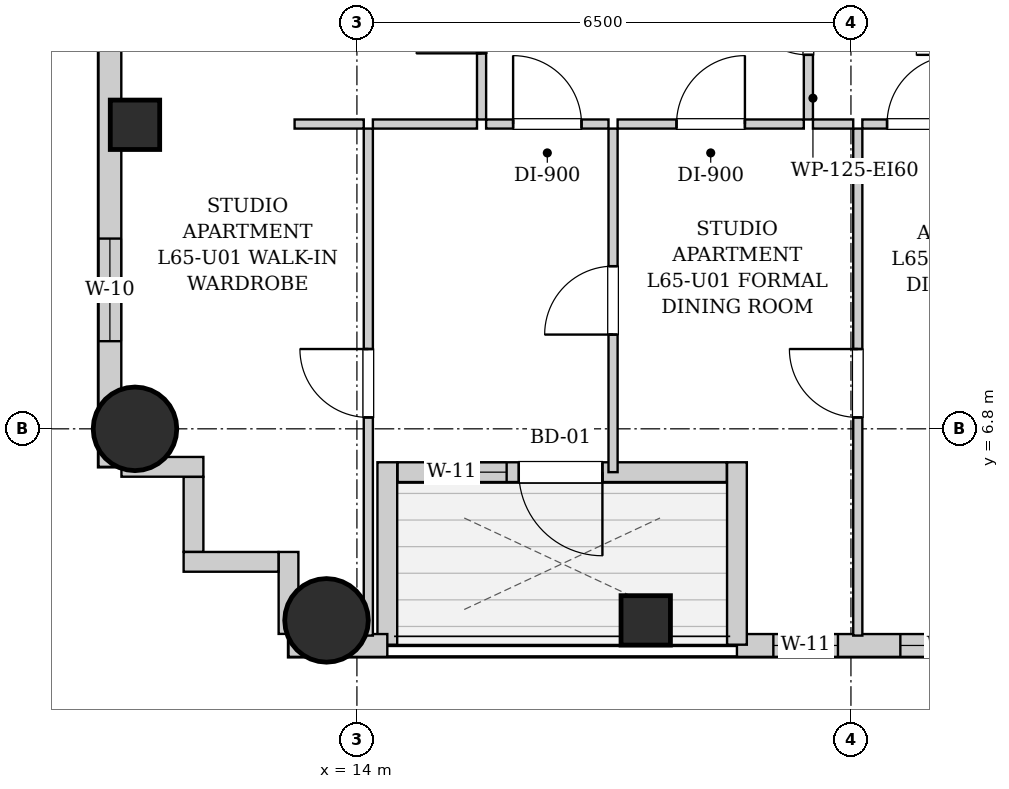
"""IFC4 building model, lengths in metres.
Left out: names, types, materials, properties, quantities, classifications, styles, units other than length and angle.
Written with IfcOpenShell. Run it as: python <this file> out.ifc"""

import sys

from ifc_helpers import new_model, si_unit, direction, frame, frame_2d, origin, origin_2d, place, context, subcontext, project, spatial, rectangle, circle, extrude, element, fill, save


model = new_model("IFC4")
c1 = context("Model", 3, precision=1e-05, world=origin(), true_north=direction((0.0, 1.0)))
c2 = subcontext(c1, "Body", "Model", "MODEL_VIEW")
j1 = project(units=[si_unit("LENGTHUNIT", "METRE"), si_unit("PLANEANGLEUNIT", "RADIAN")], contexts=[c1])
p1 = place(None, origin())
s1 = spatial("IfcSite", under=j1, at=p1, CompositionType="ELEMENT")
p2 = place(p1, origin())
s2 = spatial("IfcBuilding", under=s1, at=p2, CompositionType="ELEMENT")
p3 = place(p2, frame((0.0, 0.0, 224.1)))
s3 = spatial("IfcBuildingStorey", under=s2, at=p3, CompositionType="ELEMENT", Elevation=224.1)
p4 = place(p3, frame((13.6, 4.28, 0.0), z_axis=(0.0, 0.0, 1.0), x_axis=(1.0, 0.0, 0.0)))
e1 = element("IfcColumn", 1, at=p4, inside=s3, PredefinedType="COLUMN", context=c2, shape_type="SweptSolid", body=[
    extrude(circle(Radius=0.55, at=origin_2d()), origin(), (0.0, 0.0, 1.0), 3.4),
])
p5 = place(p3, frame((17.8, 4.28, 0.0), z_axis=(0.0, 0.0, 1.0), x_axis=(1.0, 0.0, 0.0)))
e2 = element("IfcColumn", 2, at=p5, inside=s3, PredefinedType="COLUMN", context=c2, shape_type="SweptSolid", body=[
    extrude(rectangle(XDim=0.65, YDim=0.65, at=origin_2d()), origin(), (0.0, 0.0, 1.0), 3.4),
])
p6 = place(p3, frame((11.08, 6.8, 0.0), z_axis=(0.0, 0.0, 1.0), x_axis=(1.0, 0.0, 0.0)))
e3 = element("IfcColumn", 3, at=p6, inside=s3, PredefinedType="COLUMN", context=c2, shape_type="SweptSolid", body=[
    extrude(circle(Radius=0.55, at=origin_2d()), origin(), (0.0, 0.0, 1.0), 3.4),
])
p7 = place(p3, frame((11.08, 10.8, 0.0), z_axis=(0.0, 0.0, 1.0), x_axis=(1.0, 0.0, 0.0)))
e4 = element("IfcColumn", 4, at=p7, inside=s3, PredefinedType="COLUMN", context=c2, shape_type="SweptSolid", body=[
    extrude(rectangle(XDim=0.65, YDim=0.65, at=origin_2d()), origin(), (0.0, 0.0, 1.0), 3.4),
])
p8 = place(p3, frame((31.5, 3.95, 0.0), z_axis=(0.0, 0.0, 1.0), x_axis=(-1.0, 0.0, 0.0)))
e5 = element("IfcWall", 5, at=p8, inside=s3, PredefinedType="SOLIDWALL", context=c2, shape_type="SweptSolid", body=[
    extrude(rectangle(XDim=12.5, YDim=0.3, at=frame_2d((6.25, 0.0))), origin(), (0.0, 0.0, 1.0), 3.14),
])
p9 = place(p8, frame((11.171, 0.0, 0.55)))
e6 = element("IfcOpeningElement", 6, at=p9, cuts=e5, PredefinedType="OPENING", context=c2, shape_type="SweptSolid", body=[
    extrude(rectangle(XDim=0.85, YDim=1.2, at=frame_2d((0.425, 0.6))), frame((0.0, 0.16, 0.0), z_axis=(0.0, -1.0, 0.0), x_axis=(1.0, 0.0, 0.0)), (0.0, 0.0, 1.0), 0.32),
])
p10 = place(p8, frame((9.0, 0.0, 0.55)))
e7 = element("IfcOpeningElement", 7, at=p10, cuts=e5, PredefinedType="OPENING", context=c2, shape_type="SweptSolid", body=[
    extrude(rectangle(XDim=1.35, YDim=1.2, at=frame_2d((0.675, 0.6))), frame((0.0, 0.16, 0.0), z_axis=(0.0, -1.0, 0.0), x_axis=(1.0, 0.0, 0.0)), (0.0, 0.0, 1.0), 0.32),
])
p11 = place(p8, frame((2.186, 0.0, 0.55)))
e8 = element("IfcOpeningElement", 8, at=p11, cuts=e5, PredefinedType="OPENING", context=c2, shape_type="SweptSolid", body=[
    extrude(rectangle(XDim=1.35, YDim=1.2, at=frame_2d((0.675, 0.6))), frame((0.0, 0.16, 0.0), z_axis=(0.0, -1.0, 0.0), x_axis=(1.0, 0.0, 0.0)), (0.0, 0.0, 1.0), 0.32),
])
p12 = place(p8, frame((0.35, 0.0, 0.55)))
e9 = element("IfcOpeningElement", 9, at=p12, cuts=e5, PredefinedType="OPENING", context=c2, shape_type="SweptSolid", body=[
    extrude(rectangle(XDim=0.68, YDim=1.2, at=frame_2d((0.34, 0.6))), frame((0.0, 0.16, 0.0), z_axis=(0.0, -1.0, 0.0), x_axis=(1.0, 0.0, 0.0)), (0.0, 0.0, 1.0), 0.32),
])
p13 = place(p3, frame((19.0, 3.96, 0.0), z_axis=(0.0, 0.0, 1.0), x_axis=(0.0, 1.0, 0.0)))
e10 = element("IfcWall", 10, at=p13, inside=s3, PredefinedType="SOLIDWALL", context=c2, shape_type="SweptSolid", body=[
    extrude(rectangle(XDim=2.4, YDim=0.26, at=frame_2d((1.2, 0.0))), origin(), (0.0, 0.0, 1.0), 3.14),
])
p14 = place(p3, frame((18.866, 6.23, 0.0), z_axis=(0.0, 0.0, 1.0), x_axis=(-1.0, 0.0, 0.0)))
e11 = element("IfcWall", 11, at=p14, inside=s3, PredefinedType="SOLIDWALL", context=c2, shape_type="SweptSolid", body=[
    extrude(rectangle(XDim=4.332, YDim=0.26, at=frame_2d((2.166, 0.0))), origin(), (0.0, 0.0, 1.0), 3.14),
])
p15 = place(p14, frame((1.636, 0.0, 0.0)))
e12 = element("IfcOpeningElement", 12, at=p15, cuts=e11, PredefinedType="OPENING", context=c2, shape_type="SweptSolid", body=[
    extrude(rectangle(XDim=1.1, YDim=2.0, at=frame_2d((0.55, 1.0))), frame((0.0, 0.14, 0.0), z_axis=(0.0, -1.0, 0.0), x_axis=(1.0, 0.0, 0.0)), (0.0, 0.0, 1.0), 0.28),
])
p16 = place(p14, frame((2.896, 0.0, 0.55)))
e13 = element("IfcOpeningElement", 13, at=p16, cuts=e11, PredefinedType="OPENING", context=c2, shape_type="SweptSolid", body=[
    extrude(rectangle(XDim=0.85, YDim=1.2, at=frame_2d((0.425, 0.6))), frame((0.0, 0.14, 0.0), z_axis=(0.0, -1.0, 0.0), x_axis=(1.0, 0.0, 0.0)), (0.0, 0.0, 1.0), 0.28),
])
p17 = place(p3, frame((14.4, 6.36, 0.0), z_axis=(0.0, 0.0, 1.0), x_axis=(0.0, -1.0, 0.0)))
e14 = element("IfcWall", 14, at=p17, inside=s3, PredefinedType="SOLIDWALL", context=c2, shape_type="SweptSolid", body=[
    extrude(rectangle(XDim=2.4, YDim=0.26, at=frame_2d((1.2, 0.0))), origin(), (0.0, 0.0, 1.0), 3.14),
])
p18 = place(p3, frame((14.4, 3.95, 0.0), z_axis=(0.0, 0.0, 1.0), x_axis=(-1.0, 0.0, 0.0)))
e15 = element("IfcWall", 15, at=p18, inside=s3, PredefinedType="SOLIDWALL", context=c2, shape_type="SweptSolid", body=[
    extrude(rectangle(XDim=1.3, YDim=0.3, at=frame_2d((0.65, 0.0))), origin(), (0.0, 0.0, 1.0), 3.14),
])
p19 = place(p3, frame((10.75, 6.3, 0.0), z_axis=(0.0, 0.0, 1.0), x_axis=(0.0, 1.0, 0.0)))
e16 = element("IfcWall", 16, at=p19, inside=s3, PredefinedType="SOLIDWALL", context=c2, shape_type="SweptSolid", body=[
    extrude(rectangle(XDim=31.4, YDim=0.3, at=frame_2d((15.7, 0.0))), origin(), (0.0, 0.0, 1.0), 3.14),
])
p20 = place(p19, frame((1.653, 0.0, 0.55)))
e17 = element("IfcOpeningElement", 17, at=p20, cuts=e16, PredefinedType="OPENING", context=c2, shape_type="SweptSolid", body=[
    extrude(rectangle(XDim=1.35, YDim=1.2, at=frame_2d((0.675, 0.6))), frame((0.0, 0.16, 0.0), z_axis=(0.0, -1.0, 0.0), x_axis=(1.0, 0.0, 0.0)), (0.0, 0.0, 1.0), 0.32),
])
p21 = place(p19, frame((10.367, 0.0, 0.55)))
e18 = element("IfcOpeningElement", 18, at=p21, cuts=e16, PredefinedType="OPENING", context=c2, shape_type="SweptSolid", body=[
    extrude(rectangle(XDim=1.35, YDim=1.2, at=frame_2d((0.675, 0.6))), frame((0.0, 0.16, 0.0), z_axis=(0.0, -1.0, 0.0), x_axis=(1.0, 0.0, 0.0)), (0.0, 0.0, 1.0), 0.32),
])
p22 = place(p19, frame((19.683, 0.0, 0.55)))
e19 = element("IfcOpeningElement", 19, at=p22, cuts=e16, PredefinedType="OPENING", context=c2, shape_type="SweptSolid", body=[
    extrude(rectangle(XDim=1.35, YDim=1.2, at=frame_2d((0.675, 0.6))), frame((0.0, 0.16, 0.0), z_axis=(0.0, -1.0, 0.0), x_axis=(1.0, 0.0, 0.0)), (0.0, 0.0, 1.0), 0.32),
])
p23 = place(p3, frame((13.1, 4.102, 0.0), z_axis=(0.0, 0.0, 1.0), x_axis=(0.0, 1.0, 0.0)))
e20 = element("IfcWall", 20, at=p23, inside=s3, PredefinedType="SOLIDWALL", context=c2, shape_type="SweptSolid", body=[
    extrude(rectangle(XDim=1.078, YDim=0.26, at=frame_2d((0.539, 0.0))), origin(), (0.0, 0.0, 1.0), 3.14),
])
p24 = place(p3, frame((12.968, 5.05, 0.0), z_axis=(0.0, 0.0, 1.0), x_axis=(-1.0, 0.0, 0.0)))
e21 = element("IfcWall", 21, at=p24, inside=s3, PredefinedType="SOLIDWALL", context=c2, shape_type="SweptSolid", body=[
    extrude(rectangle(XDim=1.248, YDim=0.26, at=frame_2d((0.624, 0.0))), origin(), (0.0, 0.0, 1.0), 3.14),
])
p25 = place(p3, frame((11.85, 5.182, 0.0), z_axis=(0.0, 0.0, 1.0), x_axis=(0.0, 1.0, 0.0)))
e22 = element("IfcWall", 22, at=p25, inside=s3, PredefinedType="SOLIDWALL", context=c2, shape_type="SweptSolid", body=[
    extrude(rectangle(XDim=0.986, YDim=0.26, at=frame_2d((0.493, 0.0))), origin(), (0.0, 0.0, 1.0), 3.14),
])
p26 = place(p3, frame((11.98, 6.3, 0.0), z_axis=(0.0, 0.0, 1.0), x_axis=(-1.0, 0.0, 0.0)))
e23 = element("IfcWall", 23, at=p26, inside=s3, PredefinedType="SOLIDWALL", context=c2, shape_type="SweptSolid", body=[
    extrude(rectangle(XDim=1.078, YDim=0.26, at=frame_2d((0.539, 0.0))), origin(), (0.0, 0.0, 1.0), 3.14),
])
p27 = place(p3, frame((15.64, 10.87, 0.0), z_axis=(0.0, 0.0, 1.0), x_axis=(0.0, 1.0, 0.0)))
e24 = element("IfcWall", 24, at=p27, inside=s3, PredefinedType="PARTITIONING", context=c2, shape_type="SweptSolid", body=[
    extrude(rectangle(XDim=2.6, YDim=0.12, at=frame_2d((1.3, 0.0))), origin(), (0.0, 0.0, 1.0), 3.14),
])
p28 = place(p27, frame((0.87, 0.0, 0.0)))
e25 = element("IfcOpeningElement", 25, at=p28, cuts=e24, PredefinedType="OPENING", context=c2, shape_type="SweptSolid", body=[
    extrude(rectangle(XDim=0.86, YDim=2.05, at=frame_2d((0.43, 1.025))), frame((0.0, 0.07, 0.0), z_axis=(0.0, -1.0, 0.0), x_axis=(1.0, 0.0, 0.0)), (0.0, 0.0, 1.0), 0.14),
])
p29 = place(p3, frame((13.18, 10.81, 0.0), z_axis=(0.0, 0.0, 1.0), x_axis=(1.0, 0.0, 0.0)))
e26 = element("IfcWall", 26, at=p29, inside=s3, PredefinedType="PARTITIONING", context=c2, shape_type="SweptSolid", body=[
    extrude(rectangle(XDim=0.91, YDim=0.12, at=frame_2d((0.455, 0.0))), origin(), (0.0, 0.0, 1.0), 3.14),
])
p30 = place(p3, frame((14.21, 10.81, 0.0), z_axis=(0.0, 0.0, 1.0), x_axis=(1.0, 0.0, 0.0)))
e27 = element("IfcWall", 27, at=p30, inside=s3, PredefinedType="PARTITIONING", context=c2, shape_type="SweptSolid", body=[
    extrude(rectangle(XDim=1.37, YDim=0.12, at=frame_2d((0.685, 0.0))), origin(), (0.0, 0.0, 1.0), 3.14),
])
p31 = place(p3, frame((19.94, 10.87, 0.0), z_axis=(0.0, 0.0, 1.0), x_axis=(0.0, 1.0, 0.0)))
e28 = element("IfcWall", 28, at=p31, inside=s3, PredefinedType="PARTITIONING", context=c2, shape_type="SweptSolid", body=[
    extrude(rectangle(XDim=2.6, YDim=0.12, at=frame_2d((1.3, 0.0))), origin(), (0.0, 0.0, 1.0), 3.14),
])
p32 = place(p31, frame((0.85, 0.0, 0.0)))
e29 = element("IfcOpeningElement", 29, at=p32, cuts=e28, PredefinedType="OPENING", context=c2, shape_type="SweptSolid", body=[
    extrude(rectangle(XDim=0.9, YDim=2.05, at=frame_2d((0.45, 1.025))), frame((0.0, 0.07, 0.0), z_axis=(0.0, -1.0, 0.0), x_axis=(1.0, 0.0, 0.0)), (0.0, 0.0, 1.0), 0.14),
])
p33 = place(p3, frame((15.7, 10.81, 0.0), z_axis=(0.0, 0.0, 1.0), x_axis=(1.0, 0.0, 0.0)))
e30 = element("IfcWall", 30, at=p33, inside=s3, PredefinedType="PARTITIONING", context=c2, shape_type="SweptSolid", body=[
    extrude(rectangle(XDim=1.61, YDim=0.12, at=frame_2d((0.805, 0.0))), origin(), (0.0, 0.0, 1.0), 3.14),
])
p34 = place(p33, frame((0.355, 0.0, 0.0)))
e31 = element("IfcOpeningElement", 31, at=p34, cuts=e30, PredefinedType="OPENING", context=c2, shape_type="SweptSolid", body=[
    extrude(rectangle(XDim=0.9, YDim=2.05, at=frame_2d((0.45, 1.025))), frame((0.0, 0.07, 0.0), z_axis=(0.0, -1.0, 0.0), x_axis=(1.0, 0.0, 0.0)), (0.0, 0.0, 1.0), 0.14),
])
p35 = place(p3, frame((17.43, 10.81, 0.0), z_axis=(0.0, 0.0, 1.0), x_axis=(1.0, 0.0, 0.0)))
e32 = element("IfcWall", 32, at=p35, inside=s3, PredefinedType="PARTITIONING", context=c2, shape_type="SweptSolid", body=[
    extrude(rectangle(XDim=2.45, YDim=0.12, at=frame_2d((1.225, 0.0))), origin(), (0.0, 0.0, 1.0), 3.14),
])
p36 = place(p35, frame((0.775, 0.0, 0.0)))
e33 = element("IfcOpeningElement", 33, at=p36, cuts=e32, PredefinedType="OPENING", context=c2, shape_type="SweptSolid", body=[
    extrude(rectangle(XDim=0.9, YDim=2.05, at=frame_2d((0.45, 1.025))), frame((0.0, 0.07, 0.0), z_axis=(0.0, -1.0, 0.0), x_axis=(1.0, 0.0, 0.0)), (0.0, 0.0, 1.0), 0.14),
])
p37 = place(p3, frame((20.0, 10.81, 0.0), z_axis=(0.0, 0.0, 1.0), x_axis=(1.0, 0.0, 0.0)))
e34 = element("IfcWall", 34, at=p37, inside=s3, PredefinedType="PARTITIONING", context=c2, shape_type="SweptSolid", body=[
    extrude(rectangle(XDim=0.53, YDim=0.12, at=frame_2d((0.265, 0.0))), origin(), (0.0, 0.0, 1.0), 3.14),
])
p38 = place(p3, frame((20.65, 10.81, 0.0), z_axis=(0.0, 0.0, 1.0), x_axis=(1.0, 0.0, 0.0)))
e35 = element("IfcWall", 35, at=p38, inside=s3, PredefinedType="PARTITIONING", context=c2, shape_type="SweptSolid", body=[
    extrude(rectangle(XDim=1.55, YDim=0.12, at=frame_2d((0.775, 0.0))), origin(), (0.0, 0.0, 1.0), 3.14),
])
p39 = place(p38, frame((0.325, 0.0, 0.0)))
e36 = element("IfcOpeningElement", 36, at=p39, cuts=e35, PredefinedType="OPENING", context=c2, shape_type="SweptSolid", body=[
    extrude(rectangle(XDim=0.9, YDim=2.05, at=frame_2d((0.45, 1.025))), frame((0.0, 0.07, 0.0), z_axis=(0.0, -1.0, 0.0), x_axis=(1.0, 0.0, 0.0)), (0.0, 0.0, 1.0), 0.14),
])
p40 = place(p3, frame((14.15, 4.08, 0.0), z_axis=(0.0, 0.0, 1.0), x_axis=(0.0, 1.0, 0.0)))
e37 = element("IfcWall", 37, at=p40, inside=s3, PredefinedType="PARTITIONING", context=c2, shape_type="SweptSolid", body=[
    extrude(rectangle(XDim=6.67, YDim=0.12, at=frame_2d((3.335, 0.0))), origin(), (0.0, 0.0, 1.0), 3.14),
])
p41 = place(p40, frame((2.87, 0.0, 0.0)))
e38 = element("IfcOpeningElement", 38, at=p41, cuts=e37, PredefinedType="OPENING", context=c2, shape_type="SweptSolid", body=[
    extrude(rectangle(XDim=0.9, YDim=2.05, at=frame_2d((0.45, 1.025))), frame((0.0, 0.07, 0.0), z_axis=(0.0, -1.0, 0.0), x_axis=(1.0, 0.0, 0.0)), (0.0, 0.0, 1.0), 0.14),
])
p42 = place(p3, frame((17.37, 6.23, 0.0), z_axis=(0.0, 0.0, 1.0), x_axis=(0.0, 1.0, 0.0)))
e39 = element("IfcWall", 39, at=p42, inside=s3, PredefinedType="PARTITIONING", context=c2, shape_type="SweptSolid", body=[
    extrude(rectangle(XDim=4.52, YDim=0.12, at=frame_2d((2.26, 0.0))), origin(), (0.0, 0.0, 1.0), 3.14),
])
p43 = place(p42, frame((1.81, 0.0, 0.0)))
e40 = element("IfcOpeningElement", 40, at=p43, cuts=e39, PredefinedType="OPENING", context=c2, shape_type="SweptSolid", body=[
    extrude(rectangle(XDim=0.9, YDim=2.05, at=frame_2d((0.45, 1.025))), frame((0.0, 0.07, 0.0), z_axis=(0.0, -1.0, 0.0), x_axis=(1.0, 0.0, 0.0)), (0.0, 0.0, 1.0), 0.14),
])
p44 = place(p3, frame((20.59, 4.08, 0.0), z_axis=(0.0, 0.0, 1.0), x_axis=(0.0, 1.0, 0.0)))
e41 = element("IfcWall", 41, at=p44, inside=s3, PredefinedType="PARTITIONING", context=c2, shape_type="SweptSolid", body=[
    extrude(rectangle(XDim=6.67, YDim=0.12, at=frame_2d((3.335, 0.0))), origin(), (0.0, 0.0, 1.0), 3.14),
])
p45 = place(p44, frame((2.87, 0.0, 0.0)))
e42 = element("IfcOpeningElement", 42, at=p45, cuts=e41, PredefinedType="OPENING", context=c2, shape_type="SweptSolid", body=[
    extrude(rectangle(XDim=0.9, YDim=2.05, at=frame_2d((0.45, 1.025))), frame((0.0, 0.07, 0.0), z_axis=(0.0, -1.0, 0.0), x_axis=(1.0, 0.0, 0.0)), (0.0, 0.0, 1.0), 0.14),
])
p46 = place(p28, origin())
e43 = element("IfcDoor", 43, at=p46, inside=s3, OperationType="SINGLE_SWING_LEFT", PredefinedType="DOOR", context=c2, shape_type="SweptSolid", body=[
    extrude(rectangle(XDim=0.86, YDim=2.05, at=frame_2d((0.43, 1.025))), frame((0.0, 0.025, 0.0), z_axis=(0.0, -1.0, 0.0), x_axis=(1.0, 0.0, 0.0)), (0.0, 0.0, 1.0), 0.05),
])
fill(e25, e43)
p47 = place(p32, origin())
e44 = element("IfcDoor", 44, at=p47, inside=s3, OperationType="SINGLE_SWING_RIGHT", PredefinedType="DOOR", context=c2, shape_type="SweptSolid", body=[
    extrude(rectangle(XDim=0.9, YDim=2.05, at=frame_2d((0.45, 1.025))), frame((0.0, 0.025, 0.0), z_axis=(0.0, -1.0, 0.0), x_axis=(1.0, 0.0, 0.0)), (0.0, 0.0, 1.0), 0.05),
])
fill(e29, e44)
p48 = place(p34, origin())
e45 = element("IfcDoor", 45, at=p48, inside=s3, OperationType="SINGLE_SWING_LEFT", PredefinedType="DOOR", context=c2, shape_type="SweptSolid", body=[
    extrude(rectangle(XDim=0.9, YDim=2.05, at=frame_2d((0.45, 1.025))), frame((0.0, 0.025, 0.0), z_axis=(0.0, -1.0, 0.0), x_axis=(1.0, 0.0, 0.0)), (0.0, 0.0, 1.0), 0.05),
])
fill(e31, e45)
p49 = place(p36, origin())
e46 = element("IfcDoor", 46, at=p49, inside=s3, OperationType="SINGLE_SWING_RIGHT", PredefinedType="DOOR", context=c2, shape_type="SweptSolid", body=[
    extrude(rectangle(XDim=0.9, YDim=2.05, at=frame_2d((0.45, 1.025))), frame((0.0, 0.025, 0.0), z_axis=(0.0, -1.0, 0.0), x_axis=(1.0, 0.0, 0.0)), (0.0, 0.0, 1.0), 0.05),
])
fill(e33, e46)
p50 = place(p39, origin())
e47 = element("IfcDoor", 47, at=p50, inside=s3, OperationType="SINGLE_SWING_RIGHT", PredefinedType="DOOR", context=c2, shape_type="SweptSolid", body=[
    extrude(rectangle(XDim=0.9, YDim=2.05, at=frame_2d((0.45, 1.025))), frame((0.0, 0.025, 0.0), z_axis=(0.0, -1.0, 0.0), x_axis=(1.0, 0.0, 0.0)), (0.0, 0.0, 1.0), 0.05),
])
fill(e36, e47)
p51 = place(p41, origin())
e48 = element("IfcDoor", 48, at=p51, inside=s3, OperationType="SINGLE_SWING_RIGHT", PredefinedType="DOOR", context=c2, shape_type="SweptSolid", body=[
    extrude(rectangle(XDim=0.9, YDim=2.05, at=frame_2d((0.45, 1.025))), frame((0.0, 0.025, 0.0), z_axis=(0.0, -1.0, 0.0), x_axis=(1.0, 0.0, 0.0)), (0.0, 0.0, 1.0), 0.05),
])
fill(e38, e48)
p52 = place(p43, origin())
e49 = element("IfcDoor", 49, at=p52, inside=s3, OperationType="SINGLE_SWING_LEFT", PredefinedType="DOOR", context=c2, shape_type="SweptSolid", body=[
    extrude(rectangle(XDim=0.9, YDim=2.05, at=frame_2d((0.45, 1.025))), frame((0.0, 0.025, 0.0), z_axis=(0.0, -1.0, 0.0), x_axis=(1.0, 0.0, 0.0)), (0.0, 0.0, 1.0), 0.05),
])
fill(e40, e49)
p53 = place(p45, origin())
e50 = element("IfcDoor", 50, at=p53, inside=s3, OperationType="SINGLE_SWING_RIGHT", PredefinedType="DOOR", context=c2, shape_type="SweptSolid", body=[
    extrude(rectangle(XDim=0.9, YDim=2.05, at=frame_2d((0.45, 1.025))), frame((0.0, 0.025, 0.0), z_axis=(0.0, -1.0, 0.0), x_axis=(1.0, 0.0, 0.0)), (0.0, 0.0, 1.0), 0.05),
])
fill(e42, e50)
p54 = place(p15, origin())
e51 = element("IfcDoor", 51, at=p54, inside=s3, OperationType="SINGLE_SWING_LEFT", PredefinedType="DOOR", context=c2, shape_type="SweptSolid", body=[
    extrude(rectangle(XDim=1.1, YDim=2.0, at=frame_2d((0.55, 1.0))), frame((0.0, 0.025, 0.0), z_axis=(0.0, -1.0, 0.0), x_axis=(1.0, 0.0, 0.0)), (0.0, 0.0, 1.0), 0.05),
])
fill(e12, e51)
p55 = place(p20, origin())
e52 = element("IfcWindow", 52, at=p55, inside=s3, PartitioningType="SINGLE_PANEL", PredefinedType="WINDOW", context=c2, shape_type="SweptSolid", body=[
    extrude(rectangle(XDim=1.35, YDim=1.2, at=frame_2d((0.675, 0.6))), frame((0.0, 0.03, 0.0), z_axis=(0.0, -1.0, 0.0), x_axis=(1.0, 0.0, 0.0)), (0.0, 0.0, 1.0), 0.06),
])
fill(e17, e52)
p56 = place(p16, origin())
e53 = element("IfcWindow", 53, at=p56, inside=s3, PartitioningType="SINGLE_PANEL", PredefinedType="WINDOW", context=c2, shape_type="SweptSolid", body=[
    extrude(rectangle(XDim=0.85, YDim=1.2, at=frame_2d((0.425, 0.6))), frame((0.0, 0.03, 0.0), z_axis=(0.0, -1.0, 0.0), x_axis=(1.0, 0.0, 0.0)), (0.0, 0.0, 1.0), 0.06),
])
fill(e13, e53)
p57 = place(p9, origin())
e54 = element("IfcWindow", 54, at=p57, inside=s3, PartitioningType="SINGLE_PANEL", PredefinedType="WINDOW", context=c2, shape_type="SweptSolid", body=[
    extrude(rectangle(XDim=0.85, YDim=1.2, at=frame_2d((0.425, 0.6))), frame((0.0, 0.03, 0.0), z_axis=(0.0, -1.0, 0.0), x_axis=(1.0, 0.0, 0.0)), (0.0, 0.0, 1.0), 0.06),
])
fill(e6, e54)
p58 = place(p10, origin())
e55 = element("IfcWindow", 55, at=p58, inside=s3, PartitioningType="SINGLE_PANEL", PredefinedType="WINDOW", context=c2, shape_type="SweptSolid", body=[
    extrude(rectangle(XDim=1.35, YDim=1.2, at=frame_2d((0.675, 0.6))), frame((0.0, 0.03, 0.0), z_axis=(0.0, -1.0, 0.0), x_axis=(1.0, 0.0, 0.0)), (0.0, 0.0, 1.0), 0.06),
])
fill(e7, e55)
save(model, sys.argv[1])
